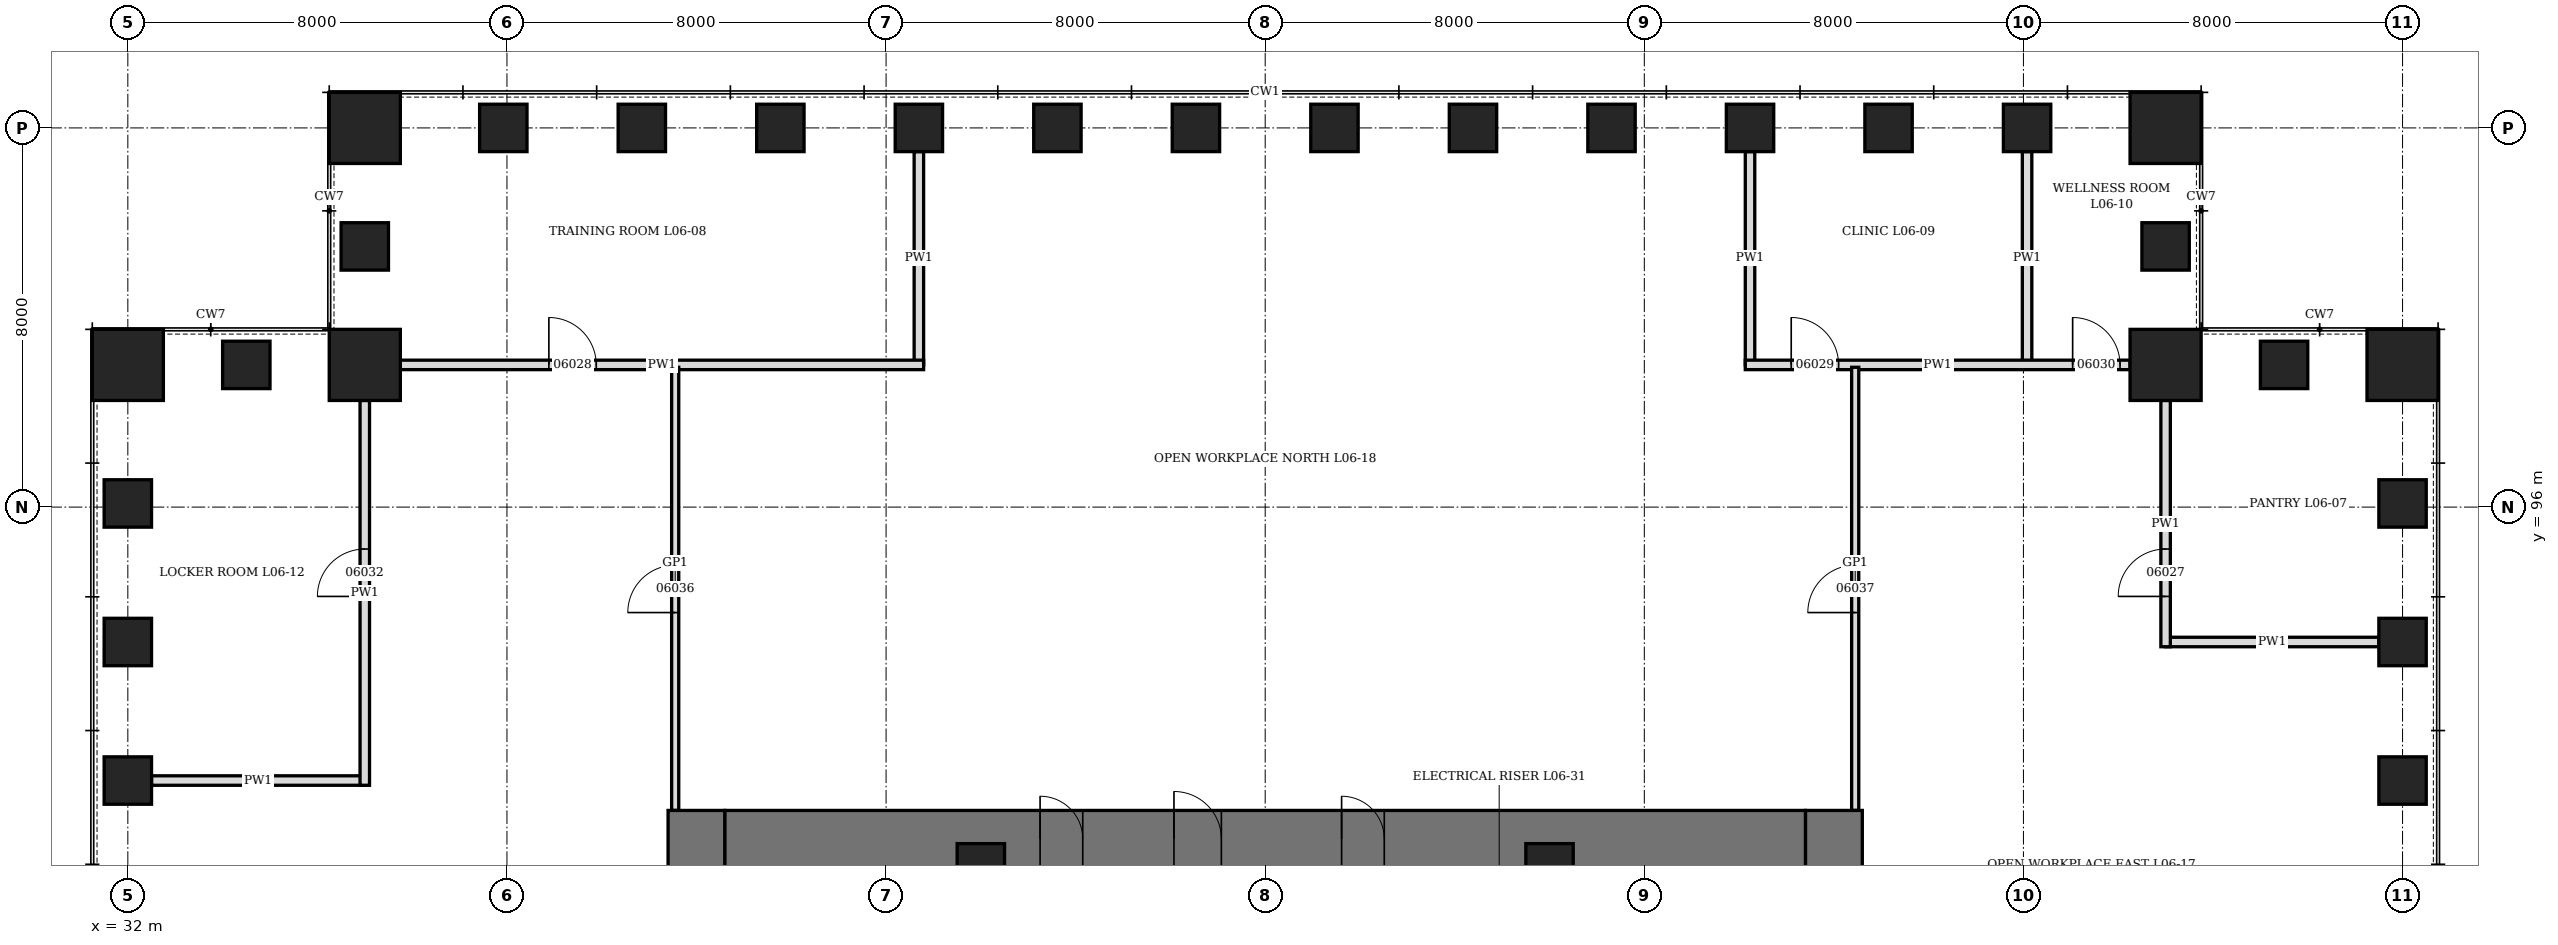
"""IFC4 building model, lengths in metres.
Left out: names, types, materials, properties, quantities, classifications, styles, units other than length and angle.
Written with IfcOpenShell. Run it as: python <this file> out.ifc"""

import sys

from ifc_helpers import new_model, si_unit, direction, frame, frame_2d, origin, origin_2d, place, context, subcontext, project, spatial, rectangle, hollow_rectangle, extrude, element, fill, save


model = new_model("IFC4")
c1 = context("Model", 3, precision=1e-05, world=origin(), true_north=direction((0.0, 1.0)))
c2 = subcontext(c1, "Body", "Model", "MODEL_VIEW")
j1 = project(units=[si_unit("LENGTHUNIT", "METRE"), si_unit("PLANEANGLEUNIT", "RADIAN")], contexts=[c1])
p1 = place(None, origin())
s1 = spatial("IfcSite", under=j1, at=p1, CompositionType="ELEMENT")
p2 = place(p1, origin())
s2 = spatial("IfcBuilding", under=s1, at=p2, CompositionType="ELEMENT")
p3 = place(p2, frame((0.0, 0.0, 34.9)))
s3 = spatial("IfcBuildingStorey", under=s2, at=p3, CompositionType="ELEMENT", Elevation=34.9)
for number, where, z_axis, x_axis in (
    (1, (80.0, 90.231, -0.3), (0.0, 0.0, 1.0), (0.0, 1.0, 0.0)),
    (2, (80.0, 93.154, -0.3), (0.0, 0.0, 1.0), (0.0, 1.0, 0.0)),
    (3, (80.0, 96.077, -0.3), (0.0, 0.0, 1.0), (0.0, 1.0, 0.0)),
):
    element("IfcColumn", number, at=place(p3, frame(where, z_axis=z_axis, x_axis=x_axis)), inside=s3, PredefinedType="COLUMN", context=c2, shape_type="SweptSolid", body=[
        extrude(hollow_rectangle(XDim=1.0, YDim=1.0, WallThickness=0.25, at=origin_2d()), origin(), (0.0, 0.0, 1.0), 4.5),
    ])
p4 = place(p3, frame((80.0, 99.0, -0.3), z_axis=(0.0, 0.0, 1.0), x_axis=(1.0, 0.0, 0.0)))
e4 = element("IfcColumn", 4, at=p4, inside=s3, PredefinedType="COLUMN", context=c2, shape_type="SweptSolid", body=[
    extrude(hollow_rectangle(XDim=1.5, YDim=1.5, WallThickness=0.6, at=origin_2d()), origin(), (0.0, 0.0, 1.0), 4.5),
])
p5 = place(p3, frame((77.5, 99.0, -0.3), z_axis=(0.0, 0.0, 1.0), x_axis=(1.0, 0.0, 0.0)))
e5 = element("IfcColumn", 5, at=p5, inside=s3, PredefinedType="COLUMN", context=c2, shape_type="SweptSolid", body=[
    extrude(hollow_rectangle(XDim=1.0, YDim=1.0, WallThickness=0.25, at=origin_2d()), origin(), (0.0, 0.0, 1.0), 4.5),
])
p6 = place(p3, frame((75.0, 99.0, -0.3), z_axis=(0.0, 0.0, 1.0), x_axis=(0.0, 1.0, 0.0)))
e6 = element("IfcColumn", 6, at=p6, inside=s3, PredefinedType="COLUMN", context=c2, shape_type="SweptSolid", body=[
    extrude(hollow_rectangle(XDim=1.5, YDim=1.5, WallThickness=0.6, at=origin_2d()), origin(), (0.0, 0.0, 1.0), 4.5),
])
p7 = place(p3, frame((75.0, 101.5, -0.3), z_axis=(0.0, 0.0, 1.0), x_axis=(0.0, 1.0, 0.0)))
e7 = element("IfcColumn", 7, at=p7, inside=s3, PredefinedType="COLUMN", context=c2, shape_type="SweptSolid", body=[
    extrude(hollow_rectangle(XDim=1.0, YDim=1.0, WallThickness=0.25, at=origin_2d()), origin(), (0.0, 0.0, 1.0), 4.5),
])
p8 = place(p3, frame((75.0, 104.0, -0.3), z_axis=(0.0, 0.0, 1.0), x_axis=(1.0, 0.0, 0.0)))
e8 = element("IfcColumn", 8, at=p8, inside=s3, PredefinedType="COLUMN", context=c2, shape_type="SweptSolid", body=[
    extrude(hollow_rectangle(XDim=1.5, YDim=1.5, WallThickness=0.6, at=origin_2d()), origin(), (0.0, 0.0, 1.0), 4.5),
])
for number, where, z_axis, x_axis in (
    (9, (72.077, 104.0, -0.3), (0.0, 0.0, 1.0), (1.0, 0.0, 0.0)),
    (10, (69.154, 104.0, -0.3), (0.0, 0.0, 1.0), (1.0, 0.0, 0.0)),
    (11, (66.231, 104.0, -0.3), (0.0, 0.0, 1.0), (1.0, 0.0, 0.0)),
    (12, (63.308, 104.0, -0.3), (0.0, 0.0, 1.0), (1.0, 0.0, 0.0)),
    (13, (60.385, 104.0, -0.3), (0.0, 0.0, 1.0), (1.0, 0.0, 0.0)),
    (14, (57.461, 104.0, -0.3), (0.0, 0.0, 1.0), (1.0, 0.0, 0.0)),
    (15, (54.539, 104.0, -0.3), (0.0, 0.0, 1.0), (1.0, 0.0, 0.0)),
    (16, (51.615, 104.0, -0.3), (0.0, 0.0, 1.0), (1.0, 0.0, 0.0)),
    (17, (48.692, 104.0, -0.3), (0.0, 0.0, 1.0), (1.0, 0.0, 0.0)),
    (18, (45.769, 104.0, -0.3), (0.0, 0.0, 1.0), (1.0, 0.0, 0.0)),
    (19, (42.846, 104.0, -0.3), (0.0, 0.0, 1.0), (1.0, 0.0, 0.0)),
    (20, (39.923, 104.0, -0.3), (0.0, 0.0, 1.0), (1.0, 0.0, 0.0)),
):
    element("IfcColumn", number, at=place(p3, frame(where, z_axis=z_axis, x_axis=x_axis)), inside=s3, PredefinedType="COLUMN", context=c2, shape_type="SweptSolid", body=[
        extrude(hollow_rectangle(XDim=1.0, YDim=1.0, WallThickness=0.25, at=origin_2d()), origin(), (0.0, 0.0, 1.0), 4.5),
    ])
p9 = place(p3, frame((37.0, 104.0, -0.3), z_axis=(0.0, 0.0, 1.0), x_axis=(0.0, 1.0, 0.0)))
e21 = element("IfcColumn", 21, at=p9, inside=s3, PredefinedType="COLUMN", context=c2, shape_type="SweptSolid", body=[
    extrude(hollow_rectangle(XDim=1.5, YDim=1.5, WallThickness=0.6, at=origin_2d()), origin(), (0.0, 0.0, 1.0), 4.5),
])
p10 = place(p3, frame((37.0, 101.5, -0.3), z_axis=(0.0, 0.0, 1.0), x_axis=(0.0, 1.0, 0.0)))
e22 = element("IfcColumn", 22, at=p10, inside=s3, PredefinedType="COLUMN", context=c2, shape_type="SweptSolid", body=[
    extrude(hollow_rectangle(XDim=1.0, YDim=1.0, WallThickness=0.25, at=origin_2d()), origin(), (0.0, 0.0, 1.0), 4.5),
])
p11 = place(p3, frame((37.0, 99.0, -0.3), z_axis=(0.0, 0.0, 1.0), x_axis=(1.0, 0.0, 0.0)))
e23 = element("IfcColumn", 23, at=p11, inside=s3, PredefinedType="COLUMN", context=c2, shape_type="SweptSolid", body=[
    extrude(hollow_rectangle(XDim=1.5, YDim=1.5, WallThickness=0.6, at=origin_2d()), origin(), (0.0, 0.0, 1.0), 4.5),
])
p12 = place(p3, frame((34.5, 99.0, -0.3), z_axis=(0.0, 0.0, 1.0), x_axis=(1.0, 0.0, 0.0)))
e24 = element("IfcColumn", 24, at=p12, inside=s3, PredefinedType="COLUMN", context=c2, shape_type="SweptSolid", body=[
    extrude(hollow_rectangle(XDim=1.0, YDim=1.0, WallThickness=0.25, at=origin_2d()), origin(), (0.0, 0.0, 1.0), 4.5),
])
p13 = place(p3, frame((32.0, 99.0, -0.3), z_axis=(0.0, 0.0, 1.0), x_axis=(0.0, 1.0, 0.0)))
e25 = element("IfcColumn", 25, at=p13, inside=s3, PredefinedType="COLUMN", context=c2, shape_type="SweptSolid", body=[
    extrude(hollow_rectangle(XDim=1.5, YDim=1.5, WallThickness=0.6, at=origin_2d()), origin(), (0.0, 0.0, 1.0), 4.5),
])
for number, where, z_axis, x_axis in (
    (26, (32.0, 96.077, -0.3), (0.0, 0.0, 1.0), (0.0, 1.0, 0.0)),
    (27, (32.0, 93.154, -0.3), (0.0, 0.0, 1.0), (0.0, 1.0, 0.0)),
    (28, (32.0, 90.231, -0.3), (0.0, 0.0, 1.0), (0.0, 1.0, 0.0)),
):
    element("IfcColumn", number, at=place(p3, frame(where, z_axis=z_axis, x_axis=x_axis)), inside=s3, PredefinedType="COLUMN", context=c2, shape_type="SweptSolid", body=[
        extrude(hollow_rectangle(XDim=1.0, YDim=1.0, WallThickness=0.25, at=origin_2d()), origin(), (0.0, 0.0, 1.0), 4.5),
    ])
p14 = place(p3, frame((44.0, 70.4, 0.0), z_axis=(0.0, 0.0, 1.0), x_axis=(0.0, 1.0, 0.0)))
e29 = element("IfcWall", 29, at=p14, inside=s3, PredefinedType="SHEAR", context=c2, shape_type="SweptSolid", body=[
    extrude(rectangle(XDim=19.2, YDim=1.2, at=frame_2d((9.6, 0.0))), origin(), (0.0, 0.0, 1.0), 4.2),
])
p15 = place(p14, frame((8.6, 0.0, 0.0)))
e30 = element("IfcOpeningElement", 30, at=p15, cuts=e29, PredefinedType="OPENING", context=c2, shape_type="SweptSolid", body=[
    extrude(rectangle(XDim=2.0, YDim=2.4, at=frame_2d((1.0, 1.2))), frame((0.0, 0.61, 0.0), z_axis=(0.0, -1.0, 0.0), x_axis=(1.0, 0.0, 0.0)), (0.0, 0.0, 1.0), 1.22),
])
p16 = place(p3, frame((68.0, 70.4, 0.0), z_axis=(0.0, 0.0, 1.0), x_axis=(0.0, 1.0, 0.0)))
e31 = element("IfcWall", 31, at=p16, inside=s3, PredefinedType="SHEAR", context=c2, shape_type="SweptSolid", body=[
    extrude(rectangle(XDim=19.2, YDim=1.2, at=frame_2d((9.6, 0.0))), origin(), (0.0, 0.0, 1.0), 4.2),
])
p17 = place(p16, frame((8.6, 0.0, 0.0)))
e32 = element("IfcOpeningElement", 32, at=p17, cuts=e31, PredefinedType="OPENING", context=c2, shape_type="SweptSolid", body=[
    extrude(rectangle(XDim=2.0, YDim=2.4, at=frame_2d((1.0, 1.2))), frame((0.0, 0.61, 0.0), z_axis=(0.0, -1.0, 0.0), x_axis=(1.0, 0.0, 0.0)), (0.0, 0.0, 1.0), 1.22),
])
p18 = place(p3, frame((44.6, 89.0, 0.0), z_axis=(0.0, 0.0, 1.0), x_axis=(1.0, 0.0, 0.0)))
e33 = element("IfcWall", 33, at=p18, inside=s3, PredefinedType="SHEAR", context=c2, shape_type="SweptSolid", body=[
    extrude(rectangle(XDim=22.8, YDim=1.2, at=frame_2d((11.4, 0.0))), origin(), (0.0, 0.0, 1.0), 4.2),
])
p19 = place(p18, frame((9.475, 0.0, 0.0)))
e34 = element("IfcOpeningElement", 34, at=p19, cuts=e33, PredefinedType="OPENING", context=c2, shape_type="SweptSolid", body=[
    extrude(rectangle(XDim=1.0, YDim=2.1, at=frame_2d((0.5, 1.05))), frame((0.0, 0.61, 0.0), z_axis=(0.0, -1.0, 0.0), x_axis=(1.0, 0.0, 0.0)), (0.0, 0.0, 1.0), 1.22),
])
p20 = place(p18, frame((6.65, 0.0, 0.0)))
e35 = element("IfcOpeningElement", 35, at=p20, cuts=e33, PredefinedType="OPENING", context=c2, shape_type="SweptSolid", body=[
    extrude(rectangle(XDim=0.9, YDim=2.1, at=frame_2d((0.45, 1.05))), frame((0.0, 0.61, 0.0), z_axis=(0.0, -1.0, 0.0), x_axis=(1.0, 0.0, 0.0)), (0.0, 0.0, 1.0), 1.22),
])
p21 = place(p18, frame((13.012, 0.0, 0.0)))
e36 = element("IfcOpeningElement", 36, at=p21, cuts=e33, PredefinedType="OPENING", context=c2, shape_type="SweptSolid", body=[
    extrude(rectangle(XDim=0.9, YDim=2.1, at=frame_2d((0.45, 1.05))), frame((0.0, 0.61, 0.0), z_axis=(0.0, -1.0, 0.0), x_axis=(1.0, 0.0, 0.0)), (0.0, 0.0, 1.0), 1.22),
])
for number, where, z_axis, x_axis in (
    (37, (50.0, 88.4, 0.0), (0.0, 0.0, 1.0), (1.0, 0.0, 0.0)),
    (38, (62.0, 88.4, 0.0), (0.0, 0.0, 1.0), (1.0, 0.0, 0.0)),
):
    element("IfcColumn", number, at=place(p3, frame(where, z_axis=z_axis, x_axis=x_axis)), inside=s3, PredefinedType="COLUMN", context=c2, shape_type="SweptSolid", body=[
        extrude(hollow_rectangle(XDim=1.0, YDim=1.0, WallThickness=0.15, at=origin_2d()), origin(), (0.0, 0.0, 1.0), 4.2),
    ])
p22 = place(p3, frame((75.0, 93.154, 0.0), z_axis=(0.0, 0.0, 1.0), x_axis=(1.0, 0.0, 0.0)))
e39 = element("IfcWall", 39, at=p22, inside=s3, PredefinedType="PARTITIONING", context=c2, shape_type="SweptSolid", body=[
    extrude(rectangle(XDim=4.5, YDim=0.2, at=frame_2d((2.25, 0.0))), origin(), (0.0, 0.0, 1.0), 3.428),
])
for number, where, z_axis, x_axis in (
    (40, (48.692, 99.0, 0.0), (0.0, 0.0, 1.0), (0.0, 1.0, 0.0)),
    (41, (66.231, 99.0, 0.0), (0.0, 0.0, 1.0), (0.0, 1.0, 0.0)),
):
    element("IfcWall", number, at=place(p3, frame(where, z_axis=z_axis, x_axis=x_axis)), inside=s3, PredefinedType="PARTITIONING", context=c2, shape_type="SweptSolid", body=[
        extrude(rectangle(XDim=4.5, YDim=0.2, at=frame_2d((2.25, 0.0))), origin(), (0.0, 0.0, 1.0), 3.278),
    ])
for number, where, z_axis, x_axis in (
    (42, (72.077, 99.0, 0.0), (0.0, 0.0, 1.0), (0.0, 1.0, 0.0)),
    (43, (32.5, 90.231, 0.0), (0.0, 0.0, 1.0), (1.0, 0.0, 0.0)),
):
    element("IfcWall", number, at=place(p3, frame(where, z_axis=z_axis, x_axis=x_axis)), inside=s3, PredefinedType="PARTITIONING", context=c2, shape_type="SweptSolid", body=[
        extrude(rectangle(XDim=4.5, YDim=0.2, at=frame_2d((2.25, 0.0))), origin(), (0.0, 0.0, 1.0), 3.428),
    ])
p23 = place(p3, frame((37.75, 99.0, 0.0), z_axis=(0.0, 0.0, 1.0), x_axis=(1.0, 0.0, 0.0)))
e44 = element("IfcWall", 44, at=p23, inside=s3, PredefinedType="PARTITIONING", context=c2, shape_type="SweptSolid", body=[
    extrude(rectangle(XDim=11.042, YDim=0.2, at=frame_2d((5.521, 0.0))), origin(), (0.0, 0.0, 1.0), 4.04),
])
p24 = place(p23, frame((3.135, 0.0, 0.0)))
e45 = element("IfcOpeningElement", 45, at=p24, cuts=e44, PredefinedType="OPENING", context=c2, shape_type="SweptSolid", body=[
    extrude(rectangle(XDim=1.0, YDim=2.1, at=frame_2d((0.5, 1.05))), frame((0.0, 0.11, 0.0), z_axis=(0.0, -1.0, 0.0), x_axis=(1.0, 0.0, 0.0)), (0.0, 0.0, 1.0), 0.22),
])
p25 = place(p3, frame((66.131, 99.0, 0.0), z_axis=(0.0, 0.0, 1.0), x_axis=(1.0, 0.0, 0.0)))
e46 = element("IfcWall", 46, at=p25, inside=s3, PredefinedType="PARTITIONING", context=c2, shape_type="SweptSolid", body=[
    extrude(rectangle(XDim=8.119, YDim=0.2, at=frame_2d((4.06, 0.0))), origin(), (0.0, 0.0, 1.0), 4.04),
])
p26 = place(p25, frame((0.969, 0.0, 0.0)))
e47 = element("IfcOpeningElement", 47, at=p26, cuts=e46, PredefinedType="OPENING", context=c2, shape_type="SweptSolid", body=[
    extrude(rectangle(XDim=1.0, YDim=2.1, at=frame_2d((0.5, 1.05))), frame((0.0, 0.11, 0.0), z_axis=(0.0, -1.0, 0.0), x_axis=(1.0, 0.0, 0.0)), (0.0, 0.0, 1.0), 0.22),
])
p27 = place(p25, frame((6.908, 0.0, 0.0)))
e48 = element("IfcOpeningElement", 48, at=p27, cuts=e46, PredefinedType="OPENING", context=c2, shape_type="SweptSolid", body=[
    extrude(rectangle(XDim=1.0, YDim=2.1, at=frame_2d((0.5, 1.05))), frame((0.0, 0.11, 0.0), z_axis=(0.0, -1.0, 0.0), x_axis=(1.0, 0.0, 0.0)), (0.0, 0.0, 1.0), 0.22),
])
p28 = place(p3, frame((37.0, 90.131, 0.0), z_axis=(0.0, 0.0, 1.0), x_axis=(0.0, 1.0, 0.0)))
e49 = element("IfcWall", 49, at=p28, inside=s3, PredefinedType="PARTITIONING", context=c2, shape_type="SweptSolid", body=[
    extrude(rectangle(XDim=8.119, YDim=0.2, at=frame_2d((4.06, 0.0))), origin(), (0.0, 0.0, 1.0), 4.04),
])
p29 = place(p28, frame((3.985, 0.0, 0.0)))
e50 = element("IfcOpeningElement", 50, at=p29, cuts=e49, PredefinedType="OPENING", context=c2, shape_type="SweptSolid", body=[
    extrude(rectangle(XDim=1.0, YDim=2.1, at=frame_2d((0.5, 1.05))), frame((0.0, 0.11, 0.0), z_axis=(0.0, -1.0, 0.0), x_axis=(1.0, 0.0, 0.0)), (0.0, 0.0, 1.0), 0.22),
])
p30 = place(p3, frame((43.55, 89.6, 0.0), z_axis=(0.0, 0.0, 1.0), x_axis=(0.0, 1.0, 0.0)))
e51 = element("IfcWall", 51, at=p30, inside=s3, PredefinedType="PARTITIONING", context=c2, shape_type="SweptSolid", body=[
    extrude(rectangle(XDim=9.35, YDim=0.15, at=frame_2d((4.675, 0.0))), origin(), (0.0, 0.0, 1.0), 4.04),
])
p31 = place(p30, frame((4.175, 0.0, 0.0)))
e52 = element("IfcOpeningElement", 52, at=p31, cuts=e51, PredefinedType="OPENING", context=c2, shape_type="SweptSolid", body=[
    extrude(rectangle(XDim=1.0, YDim=2.4, at=frame_2d((0.5, 1.2))), frame((0.0, 0.085, 0.0), z_axis=(0.0, -1.0, 0.0), x_axis=(1.0, 0.0, 0.0)), (0.0, 0.0, 1.0), 0.17),
])
p32 = place(p3, frame((68.45, 89.6, 0.0), z_axis=(0.0, 0.0, 1.0), x_axis=(0.0, 1.0, 0.0)))
e53 = element("IfcWall", 53, at=p32, inside=s3, PredefinedType="PARTITIONING", context=c2, shape_type="SweptSolid", body=[
    extrude(rectangle(XDim=9.35, YDim=0.15, at=frame_2d((4.675, 0.0))), origin(), (0.0, 0.0, 1.0), 4.04),
])
p33 = place(p32, frame((4.175, 0.0, 0.0)))
e54 = element("IfcOpeningElement", 54, at=p33, cuts=e53, PredefinedType="OPENING", context=c2, shape_type="SweptSolid", body=[
    extrude(rectangle(XDim=1.0, YDim=2.4, at=frame_2d((0.5, 1.2))), frame((0.0, 0.085, 0.0), z_axis=(0.0, -1.0, 0.0), x_axis=(1.0, 0.0, 0.0)), (0.0, 0.0, 1.0), 0.17),
])
p34 = place(p3, frame((75.0, 93.054, 0.0), z_axis=(0.0, 0.0, 1.0), x_axis=(0.0, 1.0, 0.0)))
e55 = element("IfcWall", 55, at=p34, inside=s3, PredefinedType="PARTITIONING", context=c2, shape_type="SweptSolid", body=[
    extrude(rectangle(XDim=5.196, YDim=0.2, at=frame_2d((2.598, 0.0))), origin(), (0.0, 0.0, 1.0), 4.04),
])
p35 = place(p34, frame((1.062, 0.0, 0.0)))
e56 = element("IfcOpeningElement", 56, at=p35, cuts=e55, PredefinedType="OPENING", context=c2, shape_type="SweptSolid", body=[
    extrude(rectangle(XDim=1.0, YDim=2.1, at=frame_2d((0.5, 1.05))), frame((0.0, 0.11, 0.0), z_axis=(0.0, -1.0, 0.0), x_axis=(1.0, 0.0, 0.0)), (0.0, 0.0, 1.0), 0.22),
])
p36 = place(p19, origin())
e57 = element("IfcDoor", 57, at=p36, inside=s3, OperationType="SINGLE_SWING_LEFT", PredefinedType="DOOR", context=c2, shape_type="SweptSolid", body=[
    extrude(rectangle(XDim=1.0, YDim=2.1, at=frame_2d((0.5, 1.05))), frame((0.0, 0.35, 0.0), z_axis=(0.0, -1.0, 0.0), x_axis=(1.0, 0.0, 0.0)), (0.0, 0.0, 1.0), 0.7),
])
fill(e34, e57)
p37 = place(p20, origin())
e58 = element("IfcDoor", 58, at=p37, inside=s3, OperationType="SINGLE_SWING_LEFT", PredefinedType="DOOR", context=c2, shape_type="SweptSolid", body=[
    extrude(rectangle(XDim=0.9, YDim=2.1, at=frame_2d((0.45, 1.05))), frame((0.0, 0.35, 0.0), z_axis=(0.0, -1.0, 0.0), x_axis=(1.0, 0.0, 0.0)), (0.0, 0.0, 1.0), 0.7),
])
fill(e35, e58)
p38 = place(p21, origin())
e59 = element("IfcDoor", 59, at=p38, inside=s3, OperationType="SINGLE_SWING_LEFT", PredefinedType="DOOR", context=c2, shape_type="SweptSolid", body=[
    extrude(rectangle(XDim=0.9, YDim=2.1, at=frame_2d((0.45, 1.05))), frame((0.0, 0.35, 0.0), z_axis=(0.0, -1.0, 0.0), x_axis=(1.0, 0.0, 0.0)), (0.0, 0.0, 1.0), 0.7),
])
fill(e36, e59)
p39 = place(p35, origin())
e60 = element("IfcDoor", 60, at=p39, inside=s3, OperationType="SINGLE_SWING_LEFT", PredefinedType="DOOR", context=c2, shape_type="SweptSolid", body=[
    extrude(rectangle(XDim=1.0, YDim=2.1, at=frame_2d((0.5, 1.05))), frame((0.0, 0.1, 0.0), z_axis=(0.0, -1.0, 0.0), x_axis=(1.0, 0.0, 0.0)), (0.0, 0.0, 1.0), 0.199),
])
fill(e56, e60)
p40 = place(p24, origin())
e61 = element("IfcDoor", 61, at=p40, inside=s3, OperationType="SINGLE_SWING_LEFT", PredefinedType="DOOR", context=c2, shape_type="SweptSolid", body=[
    extrude(rectangle(XDim=1.0, YDim=2.1, at=frame_2d((0.5, 1.05))), frame((0.0, 0.1, 0.0), z_axis=(0.0, -1.0, 0.0), x_axis=(1.0, 0.0, 0.0)), (0.0, 0.0, 1.0), 0.199),
])
fill(e45, e61)
p41 = place(p26, origin())
e62 = element("IfcDoor", 62, at=p41, inside=s3, OperationType="SINGLE_SWING_LEFT", PredefinedType="DOOR", context=c2, shape_type="SweptSolid", body=[
    extrude(rectangle(XDim=1.0, YDim=2.1, at=frame_2d((0.5, 1.05))), frame((0.0, 0.1, 0.0), z_axis=(0.0, -1.0, 0.0), x_axis=(1.0, 0.0, 0.0)), (0.0, 0.0, 1.0), 0.199),
])
fill(e47, e62)
p42 = place(p27, origin())
e63 = element("IfcDoor", 63, at=p42, inside=s3, OperationType="SINGLE_SWING_LEFT", PredefinedType="DOOR", context=c2, shape_type="SweptSolid", body=[
    extrude(rectangle(XDim=1.0, YDim=2.1, at=frame_2d((0.5, 1.05))), frame((0.0, 0.1, 0.0), z_axis=(0.0, -1.0, 0.0), x_axis=(1.0, 0.0, 0.0)), (0.0, 0.0, 1.0), 0.199),
])
fill(e48, e63)
p43 = place(p29, origin())
e64 = element("IfcDoor", 64, at=p43, inside=s3, OperationType="SINGLE_SWING_LEFT", PredefinedType="DOOR", context=c2, shape_type="SweptSolid", body=[
    extrude(rectangle(XDim=1.0, YDim=2.1, at=frame_2d((0.5, 1.05))), frame((0.0, 0.1, 0.0), z_axis=(0.0, -1.0, 0.0), x_axis=(1.0, 0.0, 0.0)), (0.0, 0.0, 1.0), 0.199),
])
fill(e50, e64)
p44 = place(p31, origin())
e65 = element("IfcDoor", 65, at=p44, inside=s3, OperationType="SINGLE_SWING_RIGHT", PredefinedType="DOOR", context=c2, shape_type="SweptSolid", body=[
    extrude(rectangle(XDim=1.0, YDim=2.4, at=frame_2d((0.5, 1.2))), frame((0.0, 0.075, 0.0), z_axis=(0.0, -1.0, 0.0), x_axis=(1.0, 0.0, 0.0)), (0.0, 0.0, 1.0), 0.149),
])
fill(e52, e65)
p45 = place(p33, origin())
e66 = element("IfcDoor", 66, at=p45, inside=s3, OperationType="SINGLE_SWING_RIGHT", PredefinedType="DOOR", context=c2, shape_type="SweptSolid", body=[
    extrude(rectangle(XDim=1.0, YDim=2.4, at=frame_2d((0.5, 1.2))), frame((0.0, 0.075, 0.0), z_axis=(0.0, -1.0, 0.0), x_axis=(1.0, 0.0, 0.0)), (0.0, 0.0, 1.0), 0.149),
])
fill(e54, e66)
save(model, sys.argv[1])
